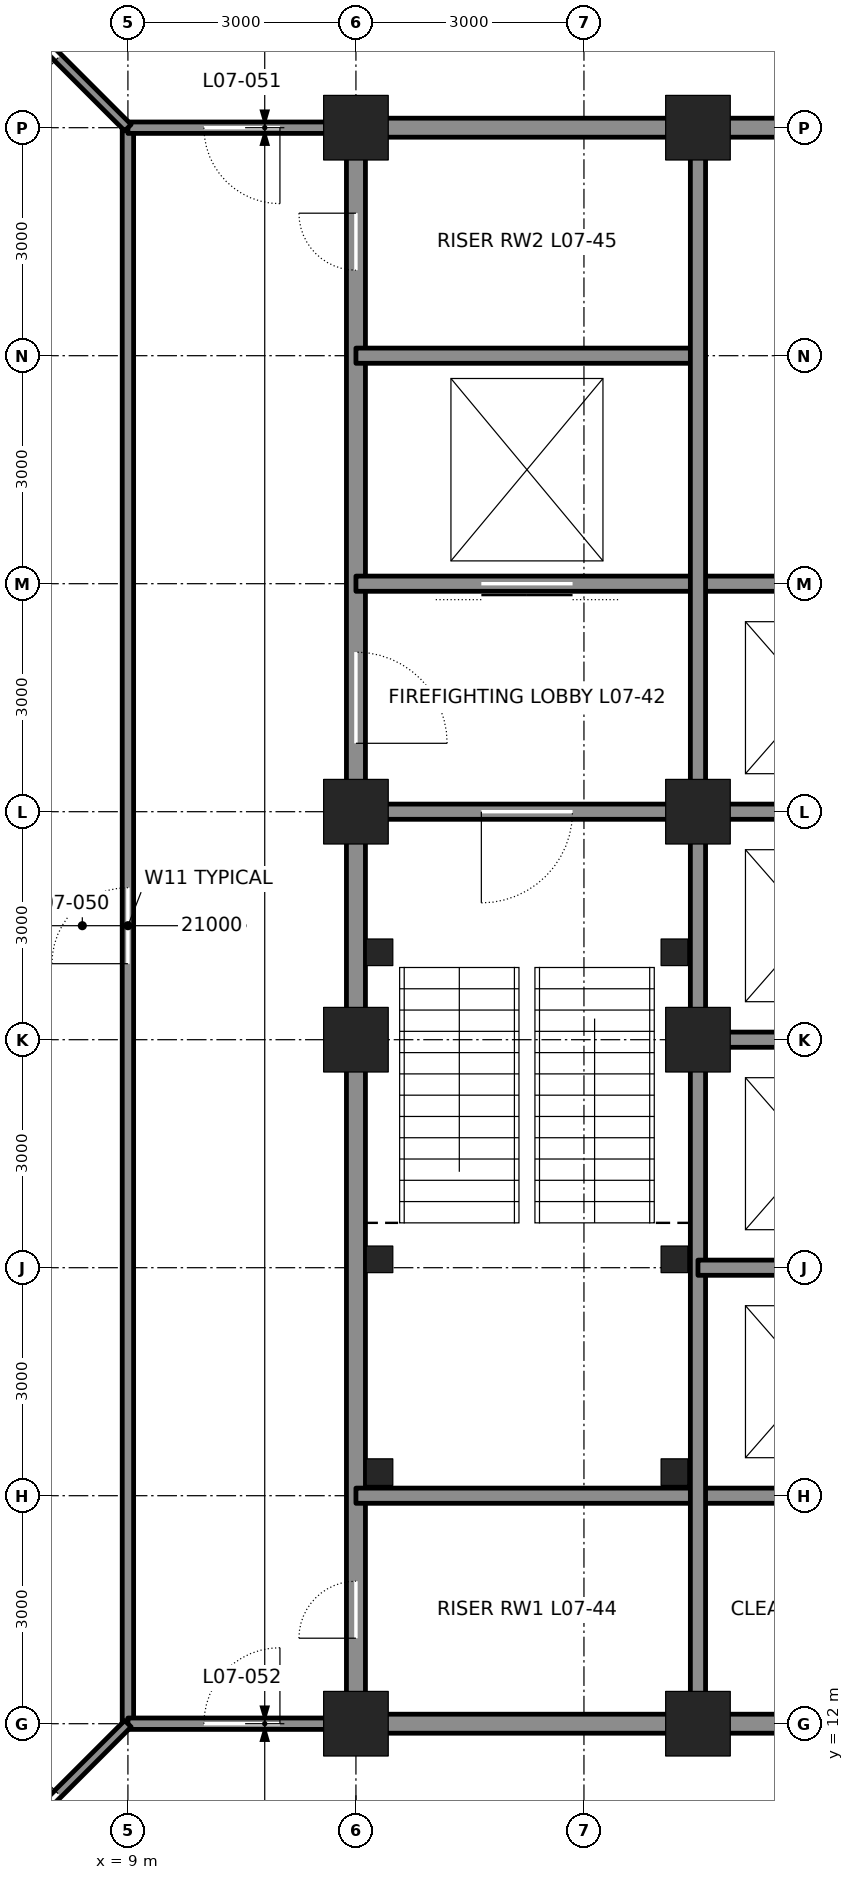
"""IFC4 building model, lengths in metres.
Left out: names, types, materials, properties, quantities, classifications, styles, units other than length and angle.
Written with IfcOpenShell. Run it as: python <this file> out.ifc"""

import sys

from ifc_helpers import new_model, si_unit, direction, frame, frame_2d, origin, origin_2d, place, context, subcontext, project, spatial, rectangle, hollow_rectangle, extrude, element, fill, save


model = new_model("IFC4")
c1 = context("Model", 3, precision=1e-05, world=origin(), true_north=direction((0.0, 1.0)))
c2 = subcontext(c1, "Body", "Model", "MODEL_VIEW")
j1 = project(units=[si_unit("LENGTHUNIT", "METRE"), si_unit("PLANEANGLEUNIT", "RADIAN")], contexts=[c1])
p1 = place(None, origin())
s1 = spatial("IfcSite", under=j1, at=p1, CompositionType="ELEMENT")
p2 = place(p1, origin())
s2 = spatial("IfcBuilding", under=s1, at=p2, CompositionType="ELEMENT")
p3 = place(p2, frame((0.0, 0.0, 37.8)))
s3 = spatial("IfcBuildingStorey", under=s2, at=p3, CompositionType="ELEMENT", Elevation=37.8)
for number, where, z_axis, x_axis in (
    (1, (12.0, 12.0, 0.0), (0.0, 0.0, 1.0), (1.0, 0.0, 0.0)),
    (2, (16.5, 12.0, 0.0), (0.0, 0.0, 1.0), (1.0, 0.0, 0.0)),
    (3, (12.0, 33.0, 0.0), (0.0, 0.0, 1.0), (1.0, 0.0, 0.0)),
    (4, (16.5, 33.0, 0.0), (0.0, 0.0, 1.0), (1.0, 0.0, 0.0)),
    (5, (12.0, 21.0, 0.0), (0.0, 0.0, 1.0), (1.0, 0.0, 0.0)),
    (6, (12.0, 24.0, 0.0), (0.0, 0.0, 1.0), (1.0, 0.0, 0.0)),
    (7, (16.5, 21.0, 0.0), (0.0, 0.0, 1.0), (1.0, 0.0, 0.0)),
    (8, (16.5, 24.0, 0.0), (0.0, 0.0, 1.0), (1.0, 0.0, 0.0)),
):
    element("IfcColumn", number, at=place(p3, frame(where, z_axis=z_axis, x_axis=x_axis)), inside=s3, PredefinedType="COLUMN", context=c2, shape_type="SweptSolid", body=[
        extrude(hollow_rectangle(XDim=0.85, YDim=0.85, WallThickness=0.085, at=origin_2d()), origin(), (0.0, 0.0, 1.0), 4.5),
    ])
p4 = place(p3, frame((12.0, 12.25, 0.0), z_axis=(0.0, 0.0, 1.0), x_axis=(0.0, 1.0, 0.0)))
e9 = element("IfcWall", 9, at=p4, inside=s3, PredefinedType="SOLIDWALL", context=c2, shape_type="SweptSolid", body=[
    extrude(rectangle(XDim=8.5, YDim=0.25, at=frame_2d((4.25, 0.0))), origin(), (0.0, 0.0, 1.0), 3.113),
])
p5 = place(p4, frame((0.875, 0.0, 0.0)))
e10 = element("IfcOpeningElement", 10, at=p5, cuts=e9, PredefinedType="OPENING", context=c2, shape_type="SweptSolid", body=[
    extrude(rectangle(XDim=0.75, YDim=2.1, at=frame_2d((0.375, 1.05))), frame((0.0, 0.135, 0.0), z_axis=(0.0, -1.0, 0.0), x_axis=(1.0, 0.0, 0.0)), (0.0, 0.0, 1.0), 0.27),
])
p6 = place(p3, frame((12.0, 21.25, 0.0), z_axis=(0.0, 0.0, 1.0), x_axis=(0.0, 1.0, 0.0)))
e11 = element("IfcWall", 11, at=p6, inside=s3, PredefinedType="SOLIDWALL", context=c2, shape_type="SweptSolid", body=[
    extrude(rectangle(XDim=2.5, YDim=0.25, at=frame_2d((1.25, 0.0))), origin(), (0.0, 0.0, 1.0), 3.113),
])
p7 = place(p3, frame((12.0, 24.25, 0.0), z_axis=(0.0, 0.0, 1.0), x_axis=(0.0, 1.0, 0.0)))
e12 = element("IfcWall", 12, at=p7, inside=s3, PredefinedType="SOLIDWALL", context=c2, shape_type="SweptSolid", body=[
    extrude(rectangle(XDim=8.5, YDim=0.25, at=frame_2d((4.25, 0.0))), origin(), (0.0, 0.0, 1.0), 3.113),
])
p8 = place(p7, frame((0.65, 0.0, 0.0)))
e13 = element("IfcOpeningElement", 13, at=p8, cuts=e12, PredefinedType="OPENING", context=c2, shape_type="SweptSolid", body=[
    extrude(rectangle(XDim=1.2, YDim=2.1, at=frame_2d((0.6, 1.05))), frame((0.0, 0.135, 0.0), z_axis=(0.0, -1.0, 0.0), x_axis=(1.0, 0.0, 0.0)), (0.0, 0.0, 1.0), 0.27),
])
p9 = place(p7, frame((6.875, 0.0, 0.0)))
e14 = element("IfcOpeningElement", 14, at=p9, cuts=e12, PredefinedType="OPENING", context=c2, shape_type="SweptSolid", body=[
    extrude(rectangle(XDim=0.75, YDim=2.1, at=frame_2d((0.375, 1.05))), frame((0.0, 0.135, 0.0), z_axis=(0.0, -1.0, 0.0), x_axis=(1.0, 0.0, 0.0)), (0.0, 0.0, 1.0), 0.27),
])
p10 = place(p3, frame((12.25, 12.0, 0.0), z_axis=(0.0, 0.0, 1.0), x_axis=(1.0, 0.0, 0.0)))
e15 = element("IfcWall", 15, at=p10, inside=s3, PredefinedType="SOLIDWALL", context=c2, shape_type="SweptSolid", body=[
    extrude(rectangle(XDim=4.0, YDim=0.25, at=frame_2d((2.0, 0.0))), origin(), (0.0, 0.0, 1.0), 3.181),
])
p11 = place(p3, frame((16.75, 12.0, 0.0), z_axis=(0.0, 0.0, 1.0), x_axis=(1.0, 0.0, 0.0)))
e16 = element("IfcWall", 16, at=p11, inside=s3, PredefinedType="SOLIDWALL", context=c2, shape_type="SweptSolid", body=[
    extrude(rectangle(XDim=2.5, YDim=0.25, at=frame_2d((1.25, 0.0))), origin(), (0.0, 0.0, 1.0), 3.181),
])
p12 = place(p3, frame((12.0, 15.0, 0.0), z_axis=(0.0, 0.0, 1.0), x_axis=(1.0, 0.0, 0.0)))
e17 = element("IfcWall", 17, at=p12, inside=s3, PredefinedType="SOLIDWALL", context=c2, shape_type="SweptSolid", body=[
    extrude(rectangle(XDim=7.5, YDim=0.2, at=frame_2d((3.75, 0.0))), origin(), (0.0, 0.0, 1.0), 4.34),
])
p13 = place(p3, frame((12.25, 24.0, 0.0), z_axis=(0.0, 0.0, 1.0), x_axis=(1.0, 0.0, 0.0)))
e18 = element("IfcWall", 18, at=p13, inside=s3, PredefinedType="SOLIDWALL", context=c2, shape_type="SweptSolid", body=[
    extrude(rectangle(XDim=4.0, YDim=0.2, at=frame_2d((2.0, 0.0))), origin(), (0.0, 0.0, 1.0), 3.39),
])
p14 = place(p13, frame((1.4, 0.0, 0.0)))
e19 = element("IfcOpeningElement", 19, at=p14, cuts=e18, PredefinedType="OPENING", context=c2, shape_type="SweptSolid", body=[
    extrude(rectangle(XDim=1.2, YDim=2.1, at=frame_2d((0.6, 1.05))), frame((0.0, 0.11, 0.0), z_axis=(0.0, -1.0, 0.0), x_axis=(1.0, 0.0, 0.0)), (0.0, 0.0, 1.0), 0.22),
])
p15 = place(p3, frame((16.75, 24.0, 0.0), z_axis=(0.0, 0.0, 1.0), x_axis=(1.0, 0.0, 0.0)))
e20 = element("IfcWall", 20, at=p15, inside=s3, PredefinedType="SOLIDWALL", context=c2, shape_type="SweptSolid", body=[
    extrude(rectangle(XDim=2.75, YDim=0.2, at=frame_2d((1.375, 0.0))), origin(), (0.0, 0.0, 1.0), 3.39),
])
p16 = place(p3, frame((12.0, 27.0, 0.0), z_axis=(0.0, 0.0, 1.0), x_axis=(1.0, 0.0, 0.0)))
e21 = element("IfcWall", 21, at=p16, inside=s3, PredefinedType="SOLIDWALL", context=c2, shape_type="SweptSolid", body=[
    extrude(rectangle(XDim=7.5, YDim=0.2, at=frame_2d((3.75, 0.0))), origin(), (0.0, 0.0, 1.0), 4.34),
])
p17 = place(p16, frame((1.65, 0.0, 0.0)))
e22 = element("IfcOpeningElement", 22, at=p17, cuts=e21, PredefinedType="OPENING", context=c2, shape_type="SweptSolid", body=[
    extrude(rectangle(XDim=1.2, YDim=2.1, at=frame_2d((0.6, 1.05))), frame((0.0, 0.11, 0.0), z_axis=(0.0, -1.0, 0.0), x_axis=(1.0, 0.0, 0.0)), (0.0, 0.0, 1.0), 0.22),
])
p18 = place(p3, frame((12.0, 30.0, 0.0), z_axis=(0.0, 0.0, 1.0), x_axis=(1.0, 0.0, 0.0)))
e23 = element("IfcWall", 23, at=p18, inside=s3, PredefinedType="SOLIDWALL", context=c2, shape_type="SweptSolid", body=[
    extrude(rectangle(XDim=4.5, YDim=0.2, at=frame_2d((2.25, 0.0))), origin(), (0.0, 0.0, 1.0), 4.34),
])
p19 = place(p3, frame((12.25, 33.0, 0.0), z_axis=(0.0, 0.0, 1.0), x_axis=(1.0, 0.0, 0.0)))
e24 = element("IfcWall", 24, at=p19, inside=s3, PredefinedType="SOLIDWALL", context=c2, shape_type="SweptSolid", body=[
    extrude(rectangle(XDim=4.0, YDim=0.25, at=frame_2d((2.0, 0.0))), origin(), (0.0, 0.0, 1.0), 3.181),
])
p20 = place(p3, frame((16.75, 33.0, 0.0), z_axis=(0.0, 0.0, 1.0), x_axis=(1.0, 0.0, 0.0)))
e25 = element("IfcWall", 25, at=p20, inside=s3, PredefinedType="SOLIDWALL", context=c2, shape_type="SweptSolid", body=[
    extrude(rectangle(XDim=2.5, YDim=0.25, at=frame_2d((1.25, 0.0))), origin(), (0.0, 0.0, 1.0), 3.181),
])
p21 = place(p3, frame((16.5, 12.25, 0.0), z_axis=(0.0, 0.0, 1.0), x_axis=(0.0, 1.0, 0.0)))
e26 = element("IfcWall", 26, at=p21, inside=s3, PredefinedType="SOLIDWALL", context=c2, shape_type="SweptSolid", body=[
    extrude(rectangle(XDim=8.5, YDim=0.2, at=frame_2d((4.25, 0.0))), origin(), (0.0, 0.0, 1.0), 3.413),
])
p22 = place(p3, frame((16.5, 21.25, 0.0), z_axis=(0.0, 0.0, 1.0), x_axis=(0.0, 1.0, 0.0)))
e27 = element("IfcWall", 27, at=p22, inside=s3, PredefinedType="SOLIDWALL", context=c2, shape_type="SweptSolid", body=[
    extrude(rectangle(XDim=2.5, YDim=0.2, at=frame_2d((1.25, 0.0))), origin(), (0.0, 0.0, 1.0), 3.413),
])
p23 = place(p3, frame((16.5, 24.25, 0.0), z_axis=(0.0, 0.0, 1.0), x_axis=(0.0, 1.0, 0.0)))
e28 = element("IfcWall", 28, at=p23, inside=s3, PredefinedType="SOLIDWALL", context=c2, shape_type="SweptSolid", body=[
    extrude(rectangle(XDim=8.5, YDim=0.2, at=frame_2d((4.25, 0.0))), origin(), (0.0, 0.0, 1.0), 3.413),
])
p24 = place(p3, frame((16.5, 18.0, 0.0), z_axis=(0.0, 0.0, 1.0), x_axis=(1.0, 0.0, 0.0)))
e29 = element("IfcWall", 29, at=p24, inside=s3, PredefinedType="SOLIDWALL", context=c2, shape_type="SweptSolid", body=[
    extrude(rectangle(XDim=3.0, YDim=0.2, at=frame_2d((1.5, 0.0))), origin(), (0.0, 0.0, 1.0), 4.34),
])
p25 = place(p3, frame((16.75, 21.0, 0.0), z_axis=(0.0, 0.0, 1.0), x_axis=(1.0, 0.0, 0.0)))
e30 = element("IfcWall", 30, at=p25, inside=s3, PredefinedType="SOLIDWALL", context=c2, shape_type="SweptSolid", body=[
    extrude(rectangle(XDim=2.75, YDim=0.2, at=frame_2d((1.375, 0.0))), origin(), (0.0, 0.0, 1.0), 3.39),
])
p26 = place(p3, frame((9.0, 12.0, -0.3), z_axis=(0.0, 0.0, 1.0), x_axis=(0.0, 1.0, 0.0)))
e31 = element("IfcWall", 31, at=p26, inside=s3, PredefinedType="PARTITIONING", context=c2, shape_type="SweptSolid", body=[
    extrude(rectangle(XDim=21.0, YDim=0.15, at=frame_2d((10.5, 0.0))), origin(), (0.0, 0.0, 1.0), 4.34),
])
p27 = place(p26, frame((10.0, 0.0, 0.3)))
e32 = element("IfcOpeningElement", 32, at=p27, cuts=e31, PredefinedType="OPENING", context=c2, shape_type="SweptSolid", body=[
    extrude(rectangle(XDim=1.0, YDim=2.4, at=frame_2d((0.5, 1.2))), frame((0.0, 0.085, 0.0), z_axis=(0.0, -1.0, 0.0), x_axis=(1.0, 0.0, 0.0)), (0.0, 0.0, 1.0), 0.17),
])
p28 = place(p3, frame((9.0, 33.0, -0.3), z_axis=(0.0, 0.0, 1.0), x_axis=(1.0, 0.0, 0.0)))
e33 = element("IfcWall", 33, at=p28, inside=s3, PredefinedType="PARTITIONING", context=c2, shape_type="SweptSolid", body=[
    extrude(rectangle(XDim=3.0, YDim=0.15, at=frame_2d((1.5, 0.0))), origin(), (0.0, 0.0, 1.0), 3.481),
])
p29 = place(p28, frame((1.0, 0.0, 0.3)))
e34 = element("IfcOpeningElement", 34, at=p29, cuts=e33, PredefinedType="OPENING", context=c2, shape_type="SweptSolid", body=[
    extrude(rectangle(XDim=1.0, YDim=2.4, at=frame_2d((0.5, 1.2))), frame((0.0, 0.085, 0.0), z_axis=(0.0, -1.0, 0.0), x_axis=(1.0, 0.0, 0.0)), (0.0, 0.0, 1.0), 0.17),
])
p30 = place(p3, frame((9.0, 12.0, -0.3), z_axis=(0.0, 0.0, 1.0), x_axis=(1.0, 0.0, 0.0)))
e35 = element("IfcWall", 35, at=p30, inside=s3, PredefinedType="PARTITIONING", context=c2, shape_type="SweptSolid", body=[
    extrude(rectangle(XDim=3.0, YDim=0.15, at=frame_2d((1.5, 0.0))), origin(), (0.0, 0.0, 1.0), 3.481),
])
p31 = place(p30, frame((1.0, 0.0, 0.3)))
e36 = element("IfcOpeningElement", 36, at=p31, cuts=e35, PredefinedType="OPENING", context=c2, shape_type="SweptSolid", body=[
    extrude(rectangle(XDim=1.0, YDim=2.4, at=frame_2d((0.5, 1.2))), frame((0.0, 0.085, 0.0), z_axis=(0.0, -1.0, 0.0), x_axis=(1.0, 0.0, 0.0)), (0.0, 0.0, 1.0), 0.17),
])
p32 = place(p3, frame((9.0, 33.0, -0.3), z_axis=(0.0, 0.0, 1.0), x_axis=(-0.707106781187, 0.707106781187, 0.0)))
e37 = element("IfcWall", 37, at=p32, inside=s3, PredefinedType="PARTITIONING", context=c2, shape_type="SweptSolid", body=[
    extrude(rectangle(XDim=11.842, YDim=0.12, at=frame_2d((5.921, 0.0))), origin(), (0.0, 0.0, 1.0), 4.34),
])
p33 = place(p32, frame((1.3, 0.0, 0.3)))
e38 = element("IfcOpeningElement", 38, at=p33, cuts=e37, PredefinedType="OPENING", context=c2, shape_type="SweptSolid", body=[
    extrude(rectangle(XDim=1.0, YDim=2.4, at=frame_2d((0.5, 1.2))), frame((0.0, 0.07, 0.0), z_axis=(0.0, -1.0, 0.0), x_axis=(1.0, 0.0, 0.0)), (0.0, 0.0, 1.0), 0.14),
])
p34 = place(p3, frame((9.0, 12.0, -0.3), z_axis=(0.0, 0.0, 1.0), x_axis=(-0.707106781187, -0.707106781187, 0.0)))
e39 = element("IfcWall", 39, at=p34, inside=s3, PredefinedType="PARTITIONING", context=c2, shape_type="SweptSolid", body=[
    extrude(rectangle(XDim=7.921, YDim=0.12, at=frame_2d((3.96, 0.0))), origin(), (0.0, 0.0, 1.0), 4.34),
])
p35 = place(p34, frame((1.3, 0.0, 0.3)))
e40 = element("IfcOpeningElement", 40, at=p35, cuts=e39, PredefinedType="OPENING", context=c2, shape_type="SweptSolid", body=[
    extrude(rectangle(XDim=1.0, YDim=2.4, at=frame_2d((0.5, 1.2))), frame((0.0, 0.07, 0.0), z_axis=(0.0, -1.0, 0.0), x_axis=(1.0, 0.0, 0.0)), (0.0, 0.0, 1.0), 0.14),
])
for number, where, z_axis, x_axis in (
    (41, (12.31, 15.31, 0.0), (0.0, 0.0, 1.0), (1.0, 0.0, 0.0)),
    (42, (16.19, 15.31, 0.0), (0.0, 0.0, 1.0), (1.0, 0.0, 0.0)),
    (43, (12.31, 18.11, 0.0), (0.0, 0.0, 1.0), (1.0, 0.0, 0.0)),
    (44, (16.19, 18.11, 0.0), (0.0, 0.0, 1.0), (1.0, 0.0, 0.0)),
    (45, (12.31, 22.15, 0.0), (0.0, 0.0, 1.0), (1.0, 0.0, 0.0)),
    (46, (16.19, 22.15, 0.0), (0.0, 0.0, 1.0), (1.0, 0.0, 0.0)),
):
    element("IfcColumn", number, at=place(p3, frame(where, z_axis=z_axis, x_axis=x_axis)), inside=s3, PredefinedType="COLUMN", context=c2, shape_type="SweptSolid", body=[
        extrude(hollow_rectangle(XDim=0.35, YDim=0.35, WallThickness=0.035, at=origin_2d()), origin(), (0.0, 0.0, 1.0), 4.5),
    ])
p36 = place(p14, frame((1.2, 0.0, 0.0), z_axis=(0.0, 0.0, 1.0), x_axis=(-1.0, 0.0, 0.0)))
e47 = element("IfcDoor", 47, at=p36, inside=s3, OperationType="SINGLE_SWING_RIGHT", PredefinedType="DOOR", context=c2, shape_type="SweptSolid", body=[
    extrude(rectangle(XDim=1.2, YDim=2.1, at=frame_2d((0.6, 1.05))), frame((0.0, 0.025, 0.0), z_axis=(0.0, -1.0, 0.0), x_axis=(1.0, 0.0, 0.0)), (0.0, 0.0, 1.0), 0.05),
])
fill(e19, e47)
p37 = place(p8, frame((1.2, 0.0, 0.0), z_axis=(0.0, 0.0, 1.0), x_axis=(-1.0, 0.0, 0.0)))
e48 = element("IfcDoor", 48, at=p37, inside=s3, OperationType="SINGLE_SWING_RIGHT", PredefinedType="DOOR", context=c2, shape_type="SweptSolid", body=[
    extrude(rectangle(XDim=1.2, YDim=2.1, at=frame_2d((0.6, 1.05))), frame((0.0, 0.025, 0.0), z_axis=(0.0, -1.0, 0.0), x_axis=(1.0, 0.0, 0.0)), (0.0, 0.0, 1.0), 0.05),
])
fill(e13, e48)
p38 = place(p17, origin())
e49 = element("IfcDoor", 49, at=p38, inside=s3, OperationType="DOUBLE_DOOR_SLIDING", PredefinedType="DOOR", context=c2, shape_type="SweptSolid", body=[
    extrude(rectangle(XDim=1.2, YDim=2.1, at=frame_2d((0.6, 1.05))), frame((0.0, 0.025, 0.0), z_axis=(0.0, -1.0, 0.0), x_axis=(1.0, 0.0, 0.0)), (0.0, 0.0, 1.0), 0.05),
])
fill(e22, e49)
p39 = place(p5, origin())
e50 = element("IfcDoor", 50, at=p39, inside=s3, OperationType="SINGLE_SWING_LEFT", PredefinedType="DOOR", context=c2, shape_type="SweptSolid", body=[
    extrude(rectangle(XDim=0.75, YDim=2.1, at=frame_2d((0.375, 1.05))), frame((0.0, 0.025, 0.0), z_axis=(0.0, -1.0, 0.0), x_axis=(1.0, 0.0, 0.0)), (0.0, 0.0, 1.0), 0.05),
])
fill(e10, e50)
p40 = place(p9, origin())
e51 = element("IfcDoor", 51, at=p40, inside=s3, OperationType="SINGLE_SWING_RIGHT", PredefinedType="DOOR", context=c2, shape_type="SweptSolid", body=[
    extrude(rectangle(XDim=0.75, YDim=2.1, at=frame_2d((0.375, 1.05))), frame((0.0, 0.025, 0.0), z_axis=(0.0, -1.0, 0.0), x_axis=(1.0, 0.0, 0.0)), (0.0, 0.0, 1.0), 0.05),
])
fill(e14, e51)
p41 = place(p27, origin())
e52 = element("IfcDoor", 52, at=p41, inside=s3, OperationType="SINGLE_SWING_LEFT", PredefinedType="DOOR", context=c2, shape_type="SweptSolid", body=[
    extrude(rectangle(XDim=1.0, YDim=2.4, at=frame_2d((0.5, 1.2))), frame((0.0, 0.025, 0.0), z_axis=(0.0, -1.0, 0.0), x_axis=(1.0, 0.0, 0.0)), (0.0, 0.0, 1.0), 0.05),
])
fill(e32, e52)
p42 = place(p29, frame((1.0, 0.0, 0.0), z_axis=(0.0, 0.0, 1.0), x_axis=(-1.0, 0.0, 0.0)))
e53 = element("IfcDoor", 53, at=p42, inside=s3, OperationType="SINGLE_SWING_LEFT", PredefinedType="DOOR", context=c2, shape_type="SweptSolid", body=[
    extrude(rectangle(XDim=1.0, YDim=2.4, at=frame_2d((0.5, 1.2))), frame((0.0, 0.025, 0.0), z_axis=(0.0, -1.0, 0.0), x_axis=(1.0, 0.0, 0.0)), (0.0, 0.0, 1.0), 0.05),
])
fill(e34, e53)
p43 = place(p31, origin())
e54 = element("IfcDoor", 54, at=p43, inside=s3, OperationType="SINGLE_SWING_RIGHT", PredefinedType="DOOR", context=c2, shape_type="SweptSolid", body=[
    extrude(rectangle(XDim=1.0, YDim=2.4, at=frame_2d((0.5, 1.2))), frame((0.0, 0.025, 0.0), z_axis=(0.0, -1.0, 0.0), x_axis=(1.0, 0.0, 0.0)), (0.0, 0.0, 1.0), 0.05),
])
fill(e36, e54)
p44 = place(p33, origin())
e55 = element("IfcDoor", 55, at=p44, inside=s3, OperationType="SINGLE_SWING_LEFT", PredefinedType="DOOR", context=c2, shape_type="SweptSolid", body=[
    extrude(rectangle(XDim=1.0, YDim=2.4, at=frame_2d((0.5, 1.2))), frame((0.0, 0.025, 0.0), z_axis=(0.0, -1.0, 0.0), x_axis=(1.0, 0.0, 0.0)), (0.0, 0.0, 1.0), 0.05),
])
fill(e38, e55)
p45 = place(p35, frame((1.0, 0.0, 0.0), z_axis=(0.0, 0.0, 1.0), x_axis=(-1.0, 0.0, 0.0)))
e56 = element("IfcDoor", 56, at=p45, inside=s3, OperationType="SINGLE_SWING_RIGHT", PredefinedType="DOOR", context=c2, shape_type="SweptSolid", body=[
    extrude(rectangle(XDim=1.0, YDim=2.4, at=frame_2d((0.5, 1.2))), frame((0.0, 0.025, 0.0), z_axis=(0.0, -1.0, 0.0), x_axis=(1.0, 0.0, 0.0)), (0.0, 0.0, 1.0), 0.05),
])
fill(e40, e56)
save(model, sys.argv[1])
